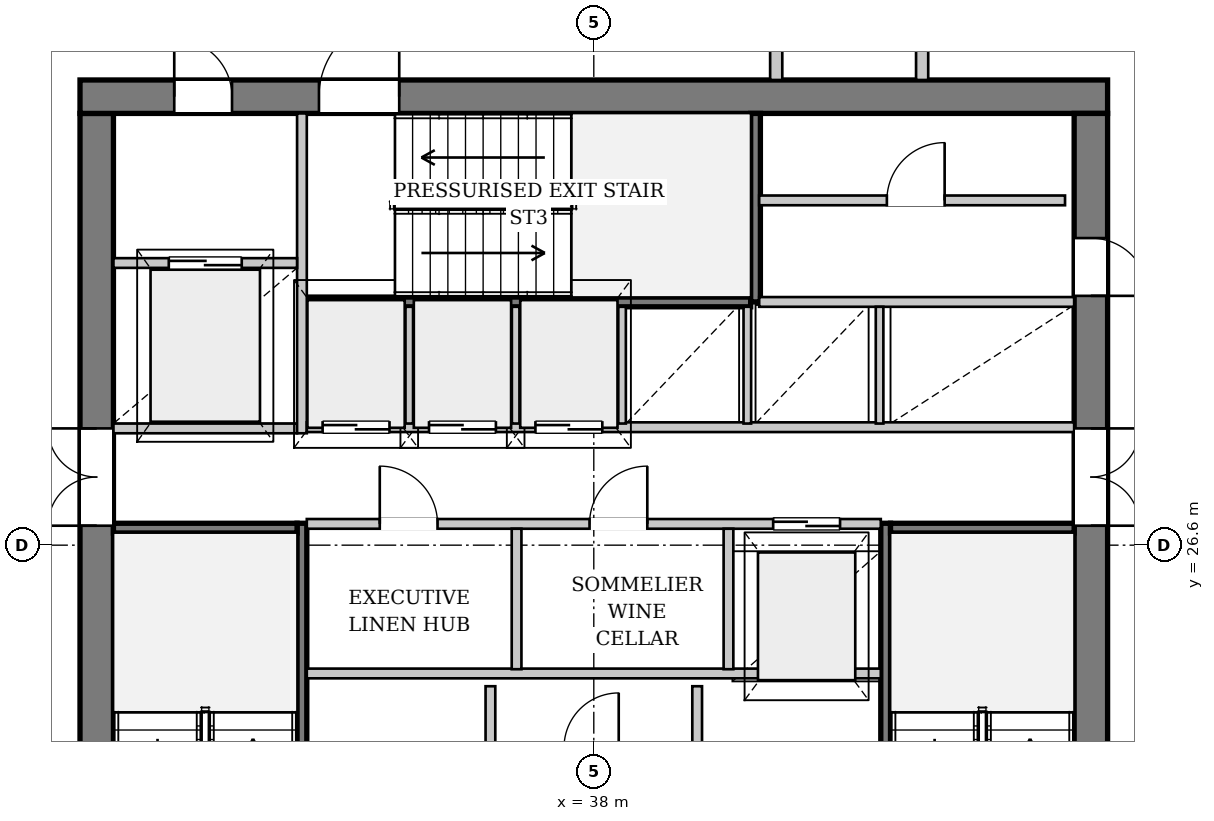
"""IFC4 building model, lengths in metres.
Left out: names, types, materials, properties, quantities, classifications, styles, units other than length and angle.
Written with IfcOpenShell. Run it as: python <this file> out.ifc"""

import sys

from ifc_helpers import new_model, si_unit, direction, frame, frame_2d, origin, place, context, subcontext, project, spatial, rectangle, extrude, source, transform, mapped, element, fill, save


model = new_model("IFC4")
c1 = context("Model", 3, precision=1e-05, world=origin(), true_north=direction((0.0, 1.0)))
c2 = subcontext(c1, "Body", "Model", "MODEL_VIEW")
j1 = project(units=[si_unit("LENGTHUNIT", "METRE"), si_unit("PLANEANGLEUNIT", "RADIAN")], contexts=[c1])
p1 = place(None, origin())
s1 = spatial("IfcSite", under=j1, at=p1, CompositionType="ELEMENT")
p2 = place(p1, origin())
s2 = spatial("IfcBuilding", under=s1, at=p2, CompositionType="ELEMENT")
p3 = place(p2, frame((0.0, 0.0, 175.0)))
s3 = spatial("IfcBuildingStorey", under=s2, at=p3, CompositionType="ELEMENT", Elevation=175.0)
p4 = place(p3, frame((29.825, 19.5, 0.0), z_axis=(0.0, 0.0, 1.0), x_axis=(0.0, 1.0, 0.0)))
e1 = element("IfcWall", 1, at=p4, inside=s3, PredefinedType="SHEAR", context=c2, shape_type="SweptSolid", body=[
    extrude(rectangle(XDim=14.2, YDim=0.55, at=frame_2d((7.1, 0.0))), origin(), (0.0, 0.0, 1.0), 3.33),
])
p5 = place(p4, frame((7.42, 0.0, 0.0)))
e2 = element("IfcOpeningElement", 2, at=p5, cuts=e1, PredefinedType="OPENING", context=c2, shape_type="SweptSolid", body=[
    extrude(rectangle(XDim=1.6, YDim=2.2, at=frame_2d((0.8, 1.1))), frame((0.0, 0.285, 0.0), z_axis=(0.0, -1.0, 0.0), x_axis=(1.0, 0.0, 0.0)), (0.0, 0.0, 1.0), 0.57),
])
p6 = place(p3, frame((29.55, 33.975, 0.0), z_axis=(0.0, 0.0, 1.0), x_axis=(1.0, 0.0, 0.0)))
e3 = element("IfcWall", 3, at=p6, inside=s3, PredefinedType="SHEAR", context=c2, shape_type="SweptSolid", body=[
    extrude(rectangle(XDim=16.9, YDim=0.55, at=frame_2d((8.45, 0.0))), origin(), (0.0, 0.0, 1.0), 3.33),
])
p7 = place(p6, frame((1.55, 0.0, 0.0)))
e4 = element("IfcOpeningElement", 4, at=p7, cuts=e3, PredefinedType="OPENING", context=c2, shape_type="SweptSolid", body=[
    extrude(rectangle(XDim=0.95, YDim=2.1, at=frame_2d((0.475, 1.05))), frame((0.0, 0.285, 0.0), z_axis=(0.0, -1.0, 0.0), x_axis=(1.0, 0.0, 0.0)), (0.0, 0.0, 1.0), 0.57),
])
p8 = place(p6, frame((3.93, 0.0, 0.0)))
e5 = element("IfcOpeningElement", 5, at=p8, cuts=e3, PredefinedType="OPENING", context=c2, shape_type="SweptSolid", body=[
    extrude(rectangle(XDim=1.32, YDim=2.2, at=frame_2d((0.66, 1.1))), frame((0.0, 0.285, 0.0), z_axis=(0.0, -1.0, 0.0), x_axis=(1.0, 0.0, 0.0)), (0.0, 0.0, 1.0), 0.57),
])
p9 = place(p3, frame((46.175, 33.7, 0.0), z_axis=(0.0, 0.0, 1.0), x_axis=(0.0, -1.0, 0.0)))
e6 = element("IfcWall", 6, at=p9, inside=s3, PredefinedType="SHEAR", context=c2, shape_type="SweptSolid", body=[
    extrude(rectangle(XDim=14.2, YDim=0.55, at=frame_2d((7.1, 0.0))), origin(), (0.0, 0.0, 1.0), 3.33),
])
p10 = place(p9, frame((5.18, 0.0, 0.0)))
e7 = element("IfcOpeningElement", 7, at=p10, cuts=e6, PredefinedType="OPENING", context=c2, shape_type="SweptSolid", body=[
    extrude(rectangle(XDim=1.6, YDim=2.2, at=frame_2d((0.8, 1.1))), frame((0.0, 0.285, 0.0), z_axis=(0.0, -1.0, 0.0), x_axis=(1.0, 0.0, 0.0)), (0.0, 0.0, 1.0), 0.57),
])
p11 = place(p9, frame((2.05, 0.0, 0.0)))
e8 = element("IfcOpeningElement", 8, at=p11, cuts=e6, PredefinedType="OPENING", context=c2, shape_type="SweptSolid", body=[
    extrude(rectangle(XDim=0.95, YDim=2.1, at=frame_2d((0.475, 1.05))), frame((0.0, 0.285, 0.0), z_axis=(0.0, -1.0, 0.0), x_axis=(1.0, 0.0, 0.0)), (0.0, 0.0, 1.0), 0.57),
])
p12 = place(p3, frame((33.2, 19.5, 0.0), z_axis=(0.0, 0.0, 1.0), x_axis=(0.0, 1.0, 0.0)))
e9 = element("IfcWall", 9, at=p12, inside=s3, PredefinedType="PARTITIONING", context=c2, shape_type="SweptSolid", body=[
    extrude(rectangle(XDim=7.46, YDim=0.16, at=frame_2d((3.73, 0.0))), origin(), (0.0, 0.0, 1.0), 3.33),
])
p13 = place(p12, frame((0.08, 0.0, 0.0)))
e10 = element("IfcOpeningElement", 10, at=p13, cuts=e9, PredefinedType="OPENING", context=c2, shape_type="SweptSolid", body=[
    extrude(rectangle(XDim=1.32, YDim=2.2, at=frame_2d((0.66, 1.1))), frame((0.0, 0.09, 0.0), z_axis=(0.0, -1.0, 0.0), x_axis=(1.0, 0.0, 0.0)), (0.0, 0.0, 1.0), 0.18),
])
p14 = place(p3, frame((30.1, 26.88, 0.0), z_axis=(0.0, 0.0, 1.0), x_axis=(1.0, 0.0, 0.0)))
e11 = element("IfcWall", 11, at=p14, inside=s3, PredefinedType="PARTITIONING", context=c2, shape_type="SweptSolid", body=[
    extrude(rectangle(XDim=3.02, YDim=0.16, at=frame_2d((1.51, 0.0))), origin(), (0.0, 0.0, 1.0), 3.33),
])
p15 = place(p3, frame((42.8, 26.96, 0.0), z_axis=(0.0, 0.0, 1.0), x_axis=(0.0, -1.0, 0.0)))
e12 = element("IfcWall", 12, at=p15, inside=s3, PredefinedType="PARTITIONING", context=c2, shape_type="SweptSolid", body=[
    extrude(rectangle(XDim=7.46, YDim=0.16, at=frame_2d((3.73, 0.0))), origin(), (0.0, 0.0, 1.0), 3.33),
])
p16 = place(p15, frame((6.06, 0.0, 0.0)))
e13 = element("IfcOpeningElement", 13, at=p16, cuts=e12, PredefinedType="OPENING", context=c2, shape_type="SweptSolid", body=[
    extrude(rectangle(XDim=1.32, YDim=2.2, at=frame_2d((0.66, 1.1))), frame((0.0, 0.09, 0.0), z_axis=(0.0, -1.0, 0.0), x_axis=(1.0, 0.0, 0.0)), (0.0, 0.0, 1.0), 0.18),
])
p17 = place(p3, frame((42.88, 26.88, 0.0), z_axis=(0.0, 0.0, 1.0), x_axis=(1.0, 0.0, 0.0)))
e14 = element("IfcWall", 14, at=p17, inside=s3, PredefinedType="PARTITIONING", context=c2, shape_type="SweptSolid", body=[
    extrude(rectangle(XDim=3.02, YDim=0.16, at=frame_2d((1.51, 0.0))), origin(), (0.0, 0.0, 1.0), 3.33),
])
p18 = place(p3, frame((33.28, 30.6, 0.0), z_axis=(0.0, 0.0, 1.0), x_axis=(1.0, 0.0, 0.0)))
e15 = element("IfcWall", 15, at=p18, inside=s3, PredefinedType="PARTITIONING", context=c2, shape_type="SweptSolid", body=[
    extrude(rectangle(XDim=7.3, YDim=0.16, at=frame_2d((3.65, 0.0))), origin(), (0.0, 0.0, 1.0), 3.33),
])
p19 = place(p3, frame((40.66, 30.6, 0.0), z_axis=(0.0, 0.0, 1.0), x_axis=(0.0, 1.0, 0.0)))
e16 = element("IfcWall", 16, at=p19, inside=s3, PredefinedType="PARTITIONING", context=c2, shape_type="SweptSolid", body=[
    extrude(rectangle(XDim=3.1, YDim=0.16, at=frame_2d((1.55, 0.0))), origin(), (0.0, 0.0, 1.0), 3.33),
])
p20 = place(p3, frame((36.3, 19.5, 0.0), z_axis=(0.0, 0.0, 1.0), x_axis=(0.0, 1.0, 0.0)))
e17 = element("IfcWall", 17, at=p20, inside=s3, PredefinedType="PARTITIONING", context=c2, shape_type="SweptSolid", body=[
    extrude(rectangle(XDim=4.78, YDim=0.16, at=frame_2d((2.39, 0.0))), origin(), (0.0, 0.0, 1.0), 3.33),
])
p21 = place(p20, frame((0.6, 0.0, 0.0)))
e18 = element("IfcOpeningElement", 18, at=p21, cuts=e17, PredefinedType="OPENING", context=c2, shape_type="SweptSolid", body=[
    extrude(rectangle(XDim=1.2, YDim=2.2, at=frame_2d((0.6, 1.1))), frame((0.0, 0.09, 0.0), z_axis=(0.0, -1.0, 0.0), x_axis=(1.0, 0.0, 0.0)), (0.0, 0.0, 1.0), 0.18),
])
p22 = place(p20, frame((2.65, 0.0, 0.0)))
e19 = element("IfcOpeningElement", 19, at=p22, cuts=e17, PredefinedType="OPENING", context=c2, shape_type="SweptSolid", body=[
    extrude(rectangle(XDim=0.95, YDim=2.1, at=frame_2d((0.475, 1.05))), frame((0.0, 0.09, 0.0), z_axis=(0.0, -1.0, 0.0), x_axis=(1.0, 0.0, 0.0)), (0.0, 0.0, 1.0), 0.18),
])
p23 = place(p3, frame((39.7, 24.28, 0.0), z_axis=(0.0, 0.0, 1.0), x_axis=(0.0, -1.0, 0.0)))
e20 = element("IfcWall", 20, at=p23, inside=s3, PredefinedType="PARTITIONING", context=c2, shape_type="SweptSolid", body=[
    extrude(rectangle(XDim=4.78, YDim=0.16, at=frame_2d((2.39, 0.0))), origin(), (0.0, 0.0, 1.0), 3.33),
])
p24 = place(p23, frame((3.12, 0.0, 0.0)))
e21 = element("IfcOpeningElement", 21, at=p24, cuts=e20, PredefinedType="OPENING", context=c2, shape_type="SweptSolid", body=[
    extrude(rectangle(XDim=1.2, YDim=2.2, at=frame_2d((0.6, 1.1))), frame((0.0, 0.09, 0.0), z_axis=(0.0, -1.0, 0.0), x_axis=(1.0, 0.0, 0.0)), (0.0, 0.0, 1.0), 0.18),
])
p25 = place(p3, frame((33.28, 24.49, 0.0), z_axis=(0.0, 0.0, 1.0), x_axis=(1.0, 0.0, 0.0)))
e22 = element("IfcWall", 22, at=p25, inside=s3, PredefinedType="PARTITIONING", context=c2, shape_type="SweptSolid", body=[
    extrude(rectangle(XDim=9.44, YDim=0.16, at=frame_2d((4.72, 0.0))), origin(), (0.0, 0.0, 1.0), 3.33),
])
p26 = place(p3, frame((30.1, 28.52, 0.0), z_axis=(0.0, 0.0, 1.0), x_axis=(1.0, 0.0, 0.0)))
e23 = element("IfcWall", 23, at=p26, inside=s3, PredefinedType="PARTITIONING", context=c2, shape_type="SweptSolid", body=[
    extrude(rectangle(XDim=3.02, YDim=0.16, at=frame_2d((1.51, 0.0))), origin(), (0.0, 0.0, 1.0), 3.33),
])
p27 = place(p3, frame((33.2, 28.44, 0.0), z_axis=(0.0, 0.0, 1.0), x_axis=(0.0, 1.0, 0.0)))
e24 = element("IfcWall", 24, at=p27, inside=s3, PredefinedType="PARTITIONING", context=c2, shape_type="SweptSolid", body=[
    extrude(rectangle(XDim=5.26, YDim=0.16, at=frame_2d((2.63, 0.0))), origin(), (0.0, 0.0, 1.0), 3.33),
])
p28 = place(p3, frame((30.1, 31.24, 0.0), z_axis=(0.0, 0.0, 1.0), x_axis=(1.0, 0.0, 0.0)))
e25 = element("IfcWall", 25, at=p28, inside=s3, PredefinedType="PARTITIONING", context=c2, shape_type="SweptSolid", body=[
    extrude(rectangle(XDim=3.02, YDim=0.16, at=frame_2d((1.51, 0.0))), origin(), (0.0, 0.0, 1.0), 3.33),
])
p29 = place(p28, frame((0.91, 0.0, 0.0)))
e26 = element("IfcOpeningElement", 26, at=p29, cuts=e25, PredefinedType="OPENING", context=c2, shape_type="SweptSolid", body=[
    extrude(rectangle(XDim=1.2, YDim=2.2, at=frame_2d((0.6, 1.1))), frame((0.0, 0.09, 0.0), z_axis=(0.0, -1.0, 0.0), x_axis=(1.0, 0.0, 0.0)), (0.0, 0.0, 1.0), 0.18),
])
p30 = place(p3, frame((33.28, 26.95, 0.0), z_axis=(0.0, 0.0, 1.0), x_axis=(1.0, 0.0, 0.0)))
e27 = element("IfcWall", 27, at=p30, inside=s3, PredefinedType="PARTITIONING", context=c2, shape_type="SweptSolid", body=[
    extrude(rectangle(XDim=9.44, YDim=0.16, at=frame_2d((4.72, 0.0))), origin(), (0.0, 0.0, 1.0), 3.33),
])
p31 = place(p30, frame((1.2, 0.0, 0.0)))
e28 = element("IfcOpeningElement", 28, at=p31, cuts=e27, PredefinedType="OPENING", context=c2, shape_type="SweptSolid", body=[
    extrude(rectangle(XDim=0.95, YDim=2.1, at=frame_2d((0.475, 1.05))), frame((0.0, 0.09, 0.0), z_axis=(0.0, -1.0, 0.0), x_axis=(1.0, 0.0, 0.0)), (0.0, 0.0, 1.0), 0.18),
])
p32 = place(p30, frame((4.65, 0.0, 0.0)))
e29 = element("IfcOpeningElement", 29, at=p32, cuts=e27, PredefinedType="OPENING", context=c2, shape_type="SweptSolid", body=[
    extrude(rectangle(XDim=0.95, YDim=2.1, at=frame_2d((0.475, 1.05))), frame((0.0, 0.09, 0.0), z_axis=(0.0, -1.0, 0.0), x_axis=(1.0, 0.0, 0.0)), (0.0, 0.0, 1.0), 0.18),
])
p33 = place(p30, frame((7.67, 0.0, 0.0)))
e30 = element("IfcOpeningElement", 30, at=p33, cuts=e27, PredefinedType="OPENING", context=c2, shape_type="SweptSolid", body=[
    extrude(rectangle(XDim=1.1, YDim=2.2, at=frame_2d((0.55, 1.1))), frame((0.0, 0.09, 0.0), z_axis=(0.0, -1.0, 0.0), x_axis=(1.0, 0.0, 0.0)), (0.0, 0.0, 1.0), 0.18),
])
for number, where, z_axis, x_axis in (
    (31, (36.73, 24.56, 0.0), (0.0, 0.0, 1.0), (0.0, 1.0, 0.0)),
    (32, (40.215, 24.56, 0.0), (0.0, 0.0, 1.0), (0.0, 1.0, 0.0)),
):
    element("IfcWall", number, at=place(p3, frame(where, z_axis=z_axis, x_axis=x_axis)), inside=s3, PredefinedType="PARTITIONING", context=c2, shape_type="SweptSolid", body=[
        extrude(rectangle(XDim=2.31, YDim=0.16, at=frame_2d((1.155, 0.0))), origin(), (0.0, 0.0, 1.0), 3.33),
    ])
p34 = place(p3, frame((33.28, 28.54, 0.0), z_axis=(0.0, 0.0, 1.0), x_axis=(1.0, 0.0, 0.0)))
e33 = element("IfcWall", 33, at=p34, inside=s3, PredefinedType="PARTITIONING", context=c2, shape_type="SweptSolid", body=[
    extrude(rectangle(XDim=12.62, YDim=0.16, at=frame_2d((6.31, 0.0))), origin(), (0.0, 0.0, 1.0), 3.33),
])
p35 = place(p34, frame((0.26, 0.0, 0.0)))
e34 = element("IfcOpeningElement", 34, at=p35, cuts=e33, PredefinedType="OPENING", context=c2, shape_type="SweptSolid", body=[
    extrude(rectangle(XDim=1.1, YDim=2.2, at=frame_2d((0.55, 1.1))), frame((0.0, 0.09, 0.0), z_axis=(0.0, -1.0, 0.0), x_axis=(1.0, 0.0, 0.0)), (0.0, 0.0, 1.0), 0.18),
])
p36 = place(p34, frame((2.01, 0.0, 0.0)))
e35 = element("IfcOpeningElement", 35, at=p36, cuts=e33, PredefinedType="OPENING", context=c2, shape_type="SweptSolid", body=[
    extrude(rectangle(XDim=1.1, YDim=2.2, at=frame_2d((0.55, 1.1))), frame((0.0, 0.09, 0.0), z_axis=(0.0, -1.0, 0.0), x_axis=(1.0, 0.0, 0.0)), (0.0, 0.0, 1.0), 0.18),
])
p37 = place(p34, frame((3.76, 0.0, 0.0)))
e36 = element("IfcOpeningElement", 36, at=p37, cuts=e33, PredefinedType="OPENING", context=c2, shape_type="SweptSolid", body=[
    extrude(rectangle(XDim=1.1, YDim=2.2, at=frame_2d((0.55, 1.1))), frame((0.0, 0.09, 0.0), z_axis=(0.0, -1.0, 0.0), x_axis=(1.0, 0.0, 0.0)), (0.0, 0.0, 1.0), 0.18),
])
p38 = place(p3, frame((40.72, 30.6, 0.0), z_axis=(0.0, 0.0, 1.0), x_axis=(1.0, 0.0, 0.0)))
e37 = element("IfcWall", 37, at=p38, inside=s3, PredefinedType="PARTITIONING", context=c2, shape_type="SweptSolid", body=[
    extrude(rectangle(XDim=5.18, YDim=0.16, at=frame_2d((2.59, 0.0))), origin(), (0.0, 0.0, 1.0), 3.33),
])
for number, where, z_axis, x_axis in (
    (38, (34.965, 28.6, 0.0), (0.0, 0.0, 1.0), (0.0, 1.0, 0.0)),
    (39, (36.715, 28.6, 0.0), (0.0, 0.0, 1.0), (0.0, 1.0, 0.0)),
    (40, (38.465, 28.6, 0.0), (0.0, 0.0, 1.0), (0.0, 1.0, 0.0)),
    (41, (40.525, 28.6, 0.0), (0.0, 0.0, 1.0), (0.0, 1.0, 0.0)),
    (42, (42.7, 28.6, 0.0), (0.0, 0.0, 1.0), (0.0, 1.0, 0.0)),
):
    element("IfcWall", number, at=place(p3, frame(where, z_axis=z_axis, x_axis=x_axis)), inside=s3, PredefinedType="PARTITIONING", context=c2, shape_type="SweptSolid", body=[
        extrude(rectangle(XDim=1.92, YDim=0.125, at=frame_2d((0.96, 0.0))), origin(), (0.0, 0.0, 1.0), 3.33),
    ])
p39 = place(p3, frame((40.72, 32.27, 0.0), z_axis=(0.0, 0.0, 1.0), x_axis=(1.0, 0.0, 0.0)))
e43 = element("IfcWall", 43, at=p39, inside=s3, PredefinedType="PARTITIONING", context=c2, shape_type="SweptSolid", body=[
    extrude(rectangle(XDim=5.03, YDim=0.16, at=frame_2d((2.515, 0.0))), origin(), (0.0, 0.0, 1.0), 3.33),
])
p40 = place(p39, frame((2.1, 0.0, 0.0)))
e44 = element("IfcOpeningElement", 44, at=p40, cuts=e43, PredefinedType="OPENING", context=c2, shape_type="SweptSolid", body=[
    extrude(rectangle(XDim=0.95, YDim=2.1, at=frame_2d((0.475, 1.05))), frame((0.0, 0.09, 0.0), z_axis=(0.0, -1.0, 0.0), x_axis=(1.0, 0.0, 0.0)), (0.0, 0.0, 1.0), 0.18),
])
for number, where, z_axis, x_axis in (
    (45, (41.0, 34.25, 0.0), (0.0, 0.0, 1.0), (0.0, 1.0, 0.0)),
    (46, (43.4, 34.25, 0.0), (0.0, 0.0, 1.0), (0.0, 1.0, 0.0)),
):
    element("IfcWall", number, at=place(p3, frame(where, z_axis=z_axis, x_axis=x_axis)), inside=s3, PredefinedType="PARTITIONING", context=c2, shape_type="SweptSolid", body=[
        extrude(rectangle(XDim=1.95, YDim=0.2, at=frame_2d((0.975, 0.0))), origin(), (0.0, 0.0, 1.0), 3.33),
    ])
m1 = source(origin(), c2, "Body", "SweptSolid", [
    extrude(rectangle(XDim=1.6, YDim=2.2, at=frame_2d((0.8, 1.1))), frame((0.0, 0.025, 0.0), z_axis=(0.0, -1.0, 0.0), x_axis=(1.0, 0.0, 0.0)), (0.0, 0.0, 1.0), 0.05),
])
p41 = place(p5, origin())
e47 = element("IfcDoor", 47, at=p41, inside=s3, OperationType="DOUBLE_DOOR_SINGLE_SWING", PredefinedType="DOOR", context=c2, shape_type="MappedRepresentation", body=[
    mapped(m1, transform((0.0, 0.0, 0.0), x_axis=(1.0, 0.0, 0.0), y_axis=(0.0, 1.0, 0.0), z_axis=(0.0, 0.0, 1.0), scale=1.0)),
])
fill(e2, e47)
m2 = source(origin(), c2, "Body", "SweptSolid", [
    extrude(rectangle(XDim=0.95, YDim=2.1, at=frame_2d((0.475, 1.05))), frame((0.0, 0.025, 0.0), z_axis=(0.0, -1.0, 0.0), x_axis=(1.0, 0.0, 0.0)), (0.0, 0.0, 1.0), 0.05),
])
p42 = place(p7, origin())
e48 = element("IfcDoor", 48, at=p42, inside=s3, OperationType="SINGLE_SWING_LEFT", PredefinedType="DOOR", context=c2, shape_type="MappedRepresentation", body=[
    mapped(m2, transform((0.0, 0.0, 0.0), x_axis=(1.0, 0.0, 0.0), y_axis=(0.0, 1.0, 0.0), z_axis=(0.0, 0.0, 1.0), scale=1.0)),
])
fill(e4, e48)
m3 = source(origin(), c2, "Body", "SweptSolid", [
    extrude(rectangle(XDim=1.32, YDim=2.2, at=frame_2d((0.66, 1.1))), frame((0.0, 0.025, 0.0), z_axis=(0.0, -1.0, 0.0), x_axis=(1.0, 0.0, 0.0)), (0.0, 0.0, 1.0), 0.05),
])
p43 = place(p8, origin())
e49 = element("IfcDoor", 49, at=p43, inside=s3, OperationType="SINGLE_SWING_RIGHT", PredefinedType="DOOR", context=c2, shape_type="MappedRepresentation", body=[
    mapped(m3, transform((0.0, 0.0, 0.0), x_axis=(1.0, 0.0, 0.0), y_axis=(0.0, 1.0, 0.0), z_axis=(0.0, 0.0, 1.0), scale=1.0)),
])
fill(e5, e49)
p44 = place(p10, origin())
e50 = element("IfcDoor", 50, at=p44, inside=s3, OperationType="DOUBLE_DOOR_SINGLE_SWING", PredefinedType="DOOR", context=c2, shape_type="MappedRepresentation", body=[
    mapped(m1, transform((0.0, 0.0, 0.0), x_axis=(1.0, 0.0, 0.0), y_axis=(0.0, 1.0, 0.0), z_axis=(0.0, 0.0, 1.0), scale=1.0)),
])
fill(e7, e50)
m4 = source(origin(), c2, "Body", "SweptSolid", [
    extrude(rectangle(XDim=1.2, YDim=2.2, at=frame_2d((0.6, 1.1))), frame((0.0, 0.025, 0.0), z_axis=(0.0, -1.0, 0.0), x_axis=(1.0, 0.0, 0.0)), (0.0, 0.0, 1.0), 0.05),
])
p45 = place(p29, origin())
e51 = element("IfcDoor", 51, at=p45, inside=s3, OperationType="DOUBLE_DOOR_SLIDING", PredefinedType="DOOR", context=c2, shape_type="MappedRepresentation", body=[
    mapped(m4, transform((0.0, 0.0, 0.0), x_axis=(1.0, 0.0, 0.0), y_axis=(0.0, 1.0, 0.0), z_axis=(0.0, 0.0, 1.0), scale=1.0)),
])
fill(e26, e51)
p46 = place(p31, origin())
e52 = element("IfcDoor", 52, at=p46, inside=s3, OperationType="SINGLE_SWING_LEFT", PredefinedType="DOOR", context=c2, shape_type="MappedRepresentation", body=[
    mapped(m2, transform((0.0, 0.0, 0.0), x_axis=(1.0, 0.0, 0.0), y_axis=(0.0, 1.0, 0.0), z_axis=(0.0, 0.0, 1.0), scale=1.0)),
])
fill(e28, e52)
p47 = place(p32, origin())
e53 = element("IfcDoor", 53, at=p47, inside=s3, OperationType="SINGLE_SWING_RIGHT", PredefinedType="DOOR", context=c2, shape_type="MappedRepresentation", body=[
    mapped(m2, transform((0.0, 0.0, 0.0), x_axis=(1.0, 0.0, 0.0), y_axis=(0.0, 1.0, 0.0), z_axis=(0.0, 0.0, 1.0), scale=1.0)),
])
fill(e29, e53)
m5 = source(origin(), c2, "Body", "SweptSolid", [
    extrude(rectangle(XDim=1.1, YDim=2.2, at=frame_2d((0.55, 1.1))), frame((0.0, 0.025, 0.0), z_axis=(0.0, -1.0, 0.0), x_axis=(1.0, 0.0, 0.0)), (0.0, 0.0, 1.0), 0.05),
])
p48 = place(p33, origin())
e54 = element("IfcDoor", 54, at=p48, inside=s3, OperationType="DOUBLE_DOOR_SLIDING", PredefinedType="DOOR", context=c2, shape_type="MappedRepresentation", body=[
    mapped(m5, transform((0.0, 0.0, 0.0), x_axis=(1.0, 0.0, 0.0), y_axis=(0.0, 1.0, 0.0), z_axis=(0.0, 0.0, 1.0), scale=1.0)),
])
fill(e30, e54)
p49 = place(p35, origin())
e55 = element("IfcDoor", 55, at=p49, inside=s3, OperationType="DOUBLE_DOOR_SLIDING", PredefinedType="DOOR", context=c2, shape_type="MappedRepresentation", body=[
    mapped(m5, transform((0.0, 0.0, 0.0), x_axis=(1.0, 0.0, 0.0), y_axis=(0.0, 1.0, 0.0), z_axis=(0.0, 0.0, 1.0), scale=1.0)),
])
fill(e34, e55)
p50 = place(p36, origin())
e56 = element("IfcDoor", 56, at=p50, inside=s3, OperationType="DOUBLE_DOOR_SLIDING", PredefinedType="DOOR", context=c2, shape_type="MappedRepresentation", body=[
    mapped(m5, transform((0.0, 0.0, 0.0), x_axis=(1.0, 0.0, 0.0), y_axis=(0.0, 1.0, 0.0), z_axis=(0.0, 0.0, 1.0), scale=1.0)),
])
fill(e35, e56)
p51 = place(p37, origin())
e57 = element("IfcDoor", 57, at=p51, inside=s3, OperationType="DOUBLE_DOOR_SLIDING", PredefinedType="DOOR", context=c2, shape_type="MappedRepresentation", body=[
    mapped(m5, transform((0.0, 0.0, 0.0), x_axis=(1.0, 0.0, 0.0), y_axis=(0.0, 1.0, 0.0), z_axis=(0.0, 0.0, 1.0), scale=1.0)),
])
fill(e36, e57)
p52 = place(p40, origin())
e58 = element("IfcDoor", 58, at=p52, inside=s3, OperationType="SINGLE_SWING_RIGHT", PredefinedType="DOOR", context=c2, shape_type="MappedRepresentation", body=[
    mapped(m2, transform((0.0, 0.0, 0.0), x_axis=(1.0, 0.0, 0.0), y_axis=(0.0, 1.0, 0.0), z_axis=(0.0, 0.0, 1.0), scale=1.0)),
])
fill(e44, e58)
p53 = place(p11, origin())
e59 = element("IfcDoor", 59, at=p53, inside=s3, OperationType="SINGLE_SWING_RIGHT", PredefinedType="DOOR", context=c2, shape_type="MappedRepresentation", body=[
    mapped(m2, transform((0.0, 0.0, 0.0), x_axis=(1.0, 0.0, 0.0), y_axis=(0.0, 1.0, 0.0), z_axis=(0.0, 0.0, 1.0), scale=1.0)),
])
fill(e8, e59)
save(model, sys.argv[1])
